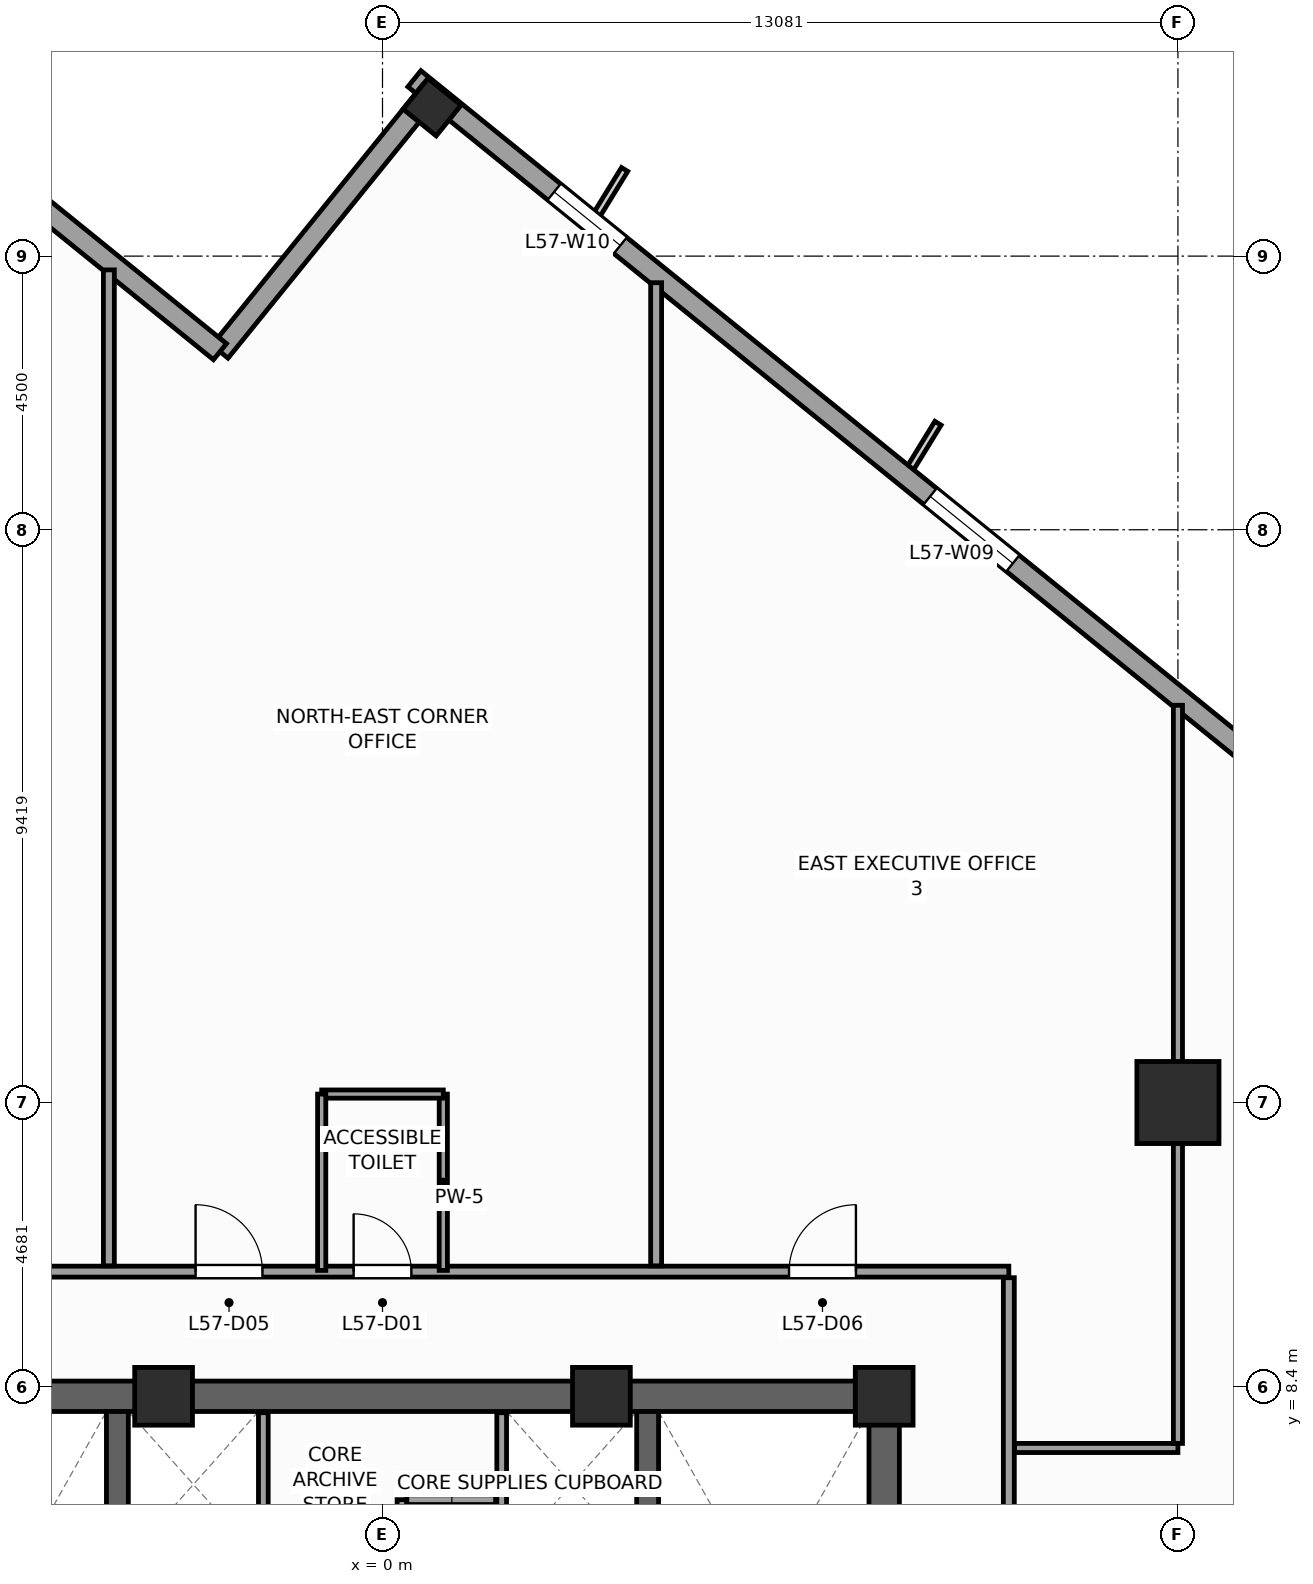
"""IFC4 building model, lengths in metres.
Left out: names, types, materials, properties, quantities, classifications, styles, units other than length and angle.
Written with IfcOpenShell. Run it as: python <this file> out.ifc"""

import sys

from ifc_helpers import new_model, si_unit, direction, frame, frame_2d, origin, origin_2d, place, context, subcontext, project, spatial, rectangle, extrude, source, transform, mapped, element, fill, save


model = new_model("IFC4")
c1 = context("Model", 3, precision=1e-05, world=origin(), true_north=direction((0.0, 1.0)))
c2 = subcontext(c1, "Body", "Model", "MODEL_VIEW")
j1 = project(units=[si_unit("LENGTHUNIT", "METRE"), si_unit("PLANEANGLEUNIT", "RADIAN")], contexts=[c1])
p1 = place(None, origin())
s1 = spatial("IfcSite", under=j1, at=p1, CompositionType="ELEMENT")
p2 = place(p1, origin())
s2 = spatial("IfcBuilding", under=s1, at=p2, CompositionType="ELEMENT")
p3 = place(p2, frame((0.0, 0.0, 236.8)))
s3 = spatial("IfcBuildingStorey", under=s2, at=p3, CompositionType="ELEMENT", Elevation=236.8)
p4 = place(p3, frame((-8.5, 8.25, 0.0), z_axis=(0.0, 0.0, 1.0), x_axis=(1.0, 0.0, 0.0)))
e1 = element("IfcWall", 1, at=p4, inside=s3, PredefinedType="SHEAR", context=c2, shape_type="SweptSolid", body=[
    extrude(rectangle(XDim=17.0, YDim=0.5, at=frame_2d((8.5, 0.0))), origin(), (0.0, 0.0, 1.0), 3.9),
])
p5 = place(p3, frame((8.25, -8.0, 0.0), z_axis=(0.0, 0.0, 1.0), x_axis=(0.0, 1.0, 0.0)))
e2 = element("IfcWall", 2, at=p5, inside=s3, PredefinedType="SHEAR", context=c2, shape_type="SweptSolid", body=[
    extrude(rectangle(XDim=16.0, YDim=0.5, at=frame_2d((8.0, 0.0))), origin(), (0.0, 0.0, 1.0), 3.9),
])
p6 = place(p5, frame((4.69, 0.0, 0.0)))
e3 = element("IfcOpeningElement", 3, at=p6, cuts=e2, PredefinedType="OPENING", context=c2, shape_type="SweptSolid", body=[
    extrude(rectangle(XDim=1.3, YDim=2.2, at=frame_2d((0.65, 1.1))), frame((0.0, 0.26, 0.0), z_axis=(0.0, -1.0, 0.0), x_axis=(1.0, 0.0, 0.0)), (0.0, 0.0, 1.0), 0.52),
])
for number, where, z_axis, x_axis in (
    (4, (-4.36, -8.0, 0.0), (0.0, 0.0, 1.0), (0.0, 1.0, 0.0)),
    (5, (4.36, -8.0, 0.0), (0.0, 0.0, 1.0), (0.0, 1.0, 0.0)),
):
    element("IfcWall", number, at=place(p3, frame(where, z_axis=z_axis, x_axis=x_axis)), inside=s3, PredefinedType="SHEAR", context=c2, shape_type="SweptSolid", body=[
        extrude(rectangle(XDim=16.0, YDim=0.36, at=frame_2d((8.0, 0.0))), origin(), (0.0, 0.0, 1.0), 3.9),
    ])
m1 = source(origin(), c2, "Body", "SweptSolid", [
    extrude(rectangle(XDim=0.95, YDim=0.95, at=origin_2d()), origin(), (0.0, 0.0, 1.0), 3.9),
])
for number, where, z_axis, x_axis in (
    (6, (8.25, 8.25, 0.0), (0.0, 0.0, 1.0), (1.0, 0.0, 0.0)),
    (7, (-3.6, 8.25, 0.0), (0.0, 0.0, 1.0), (1.0, 0.0, 0.0)),
    (8, (3.6, 8.25, 0.0), (0.0, 0.0, 1.0), (1.0, 0.0, 0.0)),
):
    element("IfcColumn", number, at=place(p3, frame(where, z_axis=z_axis, x_axis=x_axis)), inside=s3, PredefinedType="PILASTER", context=c2, shape_type="MappedRepresentation", body=[
        mapped(m1, transform((0.0, 0.0, 0.0), scale=1.0)),
    ])
m2 = source(origin(), c2, "Body", "SweptSolid", [
    extrude(rectangle(XDim=1.35, YDim=1.35, at=origin_2d()), origin(), (0.0, 0.0, 1.0), 3.9),
])
p7 = place(p3, frame((13.081, 13.081, 0.0), z_axis=(0.0, 0.0, 1.0), x_axis=(1.0, 0.0, 0.0)))
e9 = element("IfcColumn", 9, at=p7, inside=s3, PredefinedType="COLUMN", context=c2, shape_type="MappedRepresentation", body=[
    mapped(m2, transform((0.0, 0.0, 0.0), scale=1.0)),
])
m3 = source(origin(), c2, "Body", "SweptSolid", [
    extrude(rectangle(XDim=0.65, YDim=0.7, at=origin_2d()), origin(), (0.0, 0.0, 1.0), 3.9),
])
p8 = place(p3, frame((0.815, 29.45, 0.0), z_axis=(0.0, 0.0, 1.0), x_axis=(0.62932039105, 0.777145961457, 0.0)))
e10 = element("IfcColumn", 10, at=p8, inside=s3, PredefinedType="COLUMN", context=c2, shape_type="MappedRepresentation", body=[
    mapped(m3, transform((0.0, 0.0, 0.0), scale=1.0)),
])
p9 = place(p3, frame((29.154, 6.733, 0.0), z_axis=(0.0, 0.0, 1.0), x_axis=(-0.77714192302, 0.629325378072, 0.0)))
e11 = element("IfcWall", 11, at=p9, inside=s3, PredefinedType="STANDARD", context=c2, shape_type="SweptSolid", body=[
    extrude(rectangle(XDim=36.84, YDim=0.34, at=frame_2d((18.42, 0.0))), origin(), (0.0, 0.0, 1.0), 2.96),
])
p10 = place(p9, frame((3.721, 0.0, 0.48)))
e12 = element("IfcOpeningElement", 12, at=p10, cuts=e11, PredefinedType="OPENING", context=c2, shape_type="SweptSolid", body=[
    extrude(rectangle(XDim=1.4, YDim=2.4, at=frame_2d((0.7, 1.2))), frame((0.0, 0.18, 0.0), z_axis=(0.0, -1.0, 0.0), x_axis=(1.0, 0.0, 0.0)), (0.0, 0.0, 1.0), 0.36),
])
p11 = place(p9, frame((9.809, 0.0, 0.58)))
e13 = element("IfcOpeningElement", 13, at=p11, cuts=e11, PredefinedType="OPENING", context=c2, shape_type="SweptSolid", body=[
    extrude(rectangle(XDim=1.75, YDim=2.3, at=frame_2d((0.875, 1.15))), frame((0.0, 0.18, 0.0), z_axis=(0.0, -1.0, 0.0), x_axis=(1.0, 0.0, 0.0)), (0.0, 0.0, 1.0), 0.36),
])
p12 = place(p9, frame((16.058, 0.0, 0.58)))
e14 = element("IfcOpeningElement", 14, at=p12, cuts=e11, PredefinedType="OPENING", context=c2, shape_type="SweptSolid", body=[
    extrude(rectangle(XDim=1.75, YDim=2.3, at=frame_2d((0.875, 1.15))), frame((0.0, 0.18, 0.0), z_axis=(0.0, -1.0, 0.0), x_axis=(1.0, 0.0, 0.0)), (0.0, 0.0, 1.0), 0.36),
])
p13 = place(p9, frame((24.176, 0.0, 0.58)))
e15 = element("IfcOpeningElement", 15, at=p13, cuts=e11, PredefinedType="OPENING", context=c2, shape_type="SweptSolid", body=[
    extrude(rectangle(XDim=1.75, YDim=2.3, at=frame_2d((0.875, 1.15))), frame((0.0, 0.18, 0.0), z_axis=(0.0, -1.0, 0.0), x_axis=(1.0, 0.0, 0.0)), (0.0, 0.0, 1.0), 0.36),
])
p14 = place(p9, frame((32.482, 0.0, 0.48)))
e16 = element("IfcOpeningElement", 16, at=p14, cuts=e11, PredefinedType="OPENING", context=c2, shape_type="SweptSolid", body=[
    extrude(rectangle(XDim=1.4, YDim=2.4, at=frame_2d((0.7, 1.2))), frame((0.0, 0.18, 0.0), z_axis=(0.0, -1.0, 0.0), x_axis=(1.0, 0.0, 0.0)), (0.0, 0.0, 1.0), 0.36),
])
p15 = place(p3, frame((0.789, 29.703, 0.0), z_axis=(0.0, 0.0, 1.0), x_axis=(-0.629323365087, -0.77714355312, 0.0)))
e17 = element("IfcWall", 17, at=p15, inside=s3, PredefinedType="STANDARD", context=c2, shape_type="SweptSolid", body=[
    extrude(rectangle(XDim=5.5, YDim=0.34, at=frame_2d((2.75, 0.0))), origin(), (0.0, 0.0, 1.0), 3.66),
])
p16 = place(p3, frame((-2.673, 25.429, 0.0), z_axis=(0.0, 0.0, 1.0), x_axis=(-0.777162640055, 0.629299794138, 0.0)))
e18 = element("IfcWall", 18, at=p16, inside=s3, PredefinedType="STANDARD", context=c2, shape_type="SweptSolid", body=[
    extrude(rectangle(XDim=5.67, YDim=0.34, at=frame_2d((2.835, 0.0))), origin(), (0.0, 0.0, 1.0), 3.66),
])
for number, where, z_axis, x_axis in (
    (19, (-1.96, 4.58, 0.0), (0.0, 0.0, 1.0), (0.0, 1.0, 0.0)),
    (20, (1.96, 4.58, 0.0), (0.0, 0.0, 1.0), (0.0, 1.0, 0.0)),
):
    element("IfcWall", number, at=place(p3, frame(where, z_axis=z_axis, x_axis=x_axis)), inside=s3, PredefinedType="PARTITIONING", context=c2, shape_type="SweptSolid", body=[
        extrude(rectangle(XDim=3.4, YDim=0.16, at=frame_2d((1.7, 0.0))), origin(), (0.0, 0.0, 1.0), 3.66),
    ])
p17 = place(p3, frame((0.32, 4.6, 0.0), z_axis=(0.0, 0.0, 1.0), x_axis=(0.0, 1.0, 0.0)))
e21 = element("IfcWall", 21, at=p17, inside=s3, PredefinedType="PARTITIONING", context=c2, shape_type="SweptSolid", body=[
    extrude(rectangle(XDim=1.95, YDim=0.16, at=frame_2d((0.975, 0.0))), origin(), (0.0, 0.0, 1.0), 3.66),
])
p18 = place(p3, frame((0.4, 6.55, 0.0), z_axis=(0.0, 0.0, 1.0), x_axis=(1.0, 0.0, 0.0)))
e22 = element("IfcWall", 22, at=p18, inside=s3, PredefinedType="PARTITIONING", context=c2, shape_type="SweptSolid", body=[
    extrude(rectangle(XDim=1.46, YDim=0.16, at=frame_2d((0.73, 0.0))), origin(), (0.0, 0.0, 1.0), 3.66),
])
p19 = place(p3, frame((-11.4, 10.3, 0.0), z_axis=(0.0, 0.0, 1.0), x_axis=(1.0, 0.0, 0.0)))
e23 = element("IfcWall", 23, at=p19, inside=s3, PredefinedType="PARTITIONING", context=c2, shape_type="SweptSolid", body=[
    extrude(rectangle(XDim=21.7, YDim=0.18, at=frame_2d((10.85, 0.0))), origin(), (0.0, 0.0, 1.0), 3.66),
])
p20 = place(p19, frame((10.925, 0.0, 0.0)))
e24 = element("IfcOpeningElement", 24, at=p20, cuts=e23, PredefinedType="OPENING", context=c2, shape_type="SweptSolid", body=[
    extrude(rectangle(XDim=0.95, YDim=2.1, at=frame_2d((0.475, 1.05))), frame((0.0, 0.1, 0.0), z_axis=(0.0, -1.0, 0.0), x_axis=(1.0, 0.0, 0.0)), (0.0, 0.0, 1.0), 0.2),
])
p21 = place(p19, frame((3.724, 0.0, 0.0)))
e25 = element("IfcOpeningElement", 25, at=p21, cuts=e23, PredefinedType="OPENING", context=c2, shape_type="SweptSolid", body=[
    extrude(rectangle(XDim=1.1, YDim=2.2, at=frame_2d((0.55, 1.1))), frame((0.0, 0.1, 0.0), z_axis=(0.0, -1.0, 0.0), x_axis=(1.0, 0.0, 0.0)), (0.0, 0.0, 1.0), 0.2),
])
p22 = place(p19, frame((8.326, 0.0, 0.0)))
e26 = element("IfcOpeningElement", 26, at=p22, cuts=e23, PredefinedType="OPENING", context=c2, shape_type="SweptSolid", body=[
    extrude(rectangle(XDim=1.1, YDim=2.2, at=frame_2d((0.55, 1.1))), frame((0.0, 0.1, 0.0), z_axis=(0.0, -1.0, 0.0), x_axis=(1.0, 0.0, 0.0)), (0.0, 0.0, 1.0), 0.2),
])
p23 = place(p19, frame((18.085, 0.0, 0.0)))
e27 = element("IfcOpeningElement", 27, at=p23, cuts=e23, PredefinedType="OPENING", context=c2, shape_type="SweptSolid", body=[
    extrude(rectangle(XDim=1.1, YDim=2.2, at=frame_2d((0.55, 1.1))), frame((0.0, 0.1, 0.0), z_axis=(0.0, -1.0, 0.0), x_axis=(1.0, 0.0, 0.0)), (0.0, 0.0, 1.0), 0.2),
])
p24 = place(p3, frame((10.3, -10.2, 0.0), z_axis=(0.0, 0.0, 1.0), x_axis=(0.0, 1.0, 0.0)))
e28 = element("IfcWall", 28, at=p24, inside=s3, PredefinedType="PARTITIONING", context=c2, shape_type="SweptSolid", body=[
    extrude(rectangle(XDim=20.4, YDim=0.18, at=frame_2d((10.2, 0.0))), origin(), (0.0, 0.0, 1.0), 3.66),
])
p25 = place(p24, frame((14.95, 0.0, 0.0)))
e29 = element("IfcOpeningElement", 29, at=p25, cuts=e28, PredefinedType="OPENING", context=c2, shape_type="SweptSolid", body=[
    extrude(rectangle(XDim=1.1, YDim=2.2, at=frame_2d((0.55, 1.1))), frame((0.0, 0.1, 0.0), z_axis=(0.0, -1.0, 0.0), x_axis=(1.0, 0.0, 0.0)), (0.0, 0.0, 1.0), 0.2),
])
p26 = place(p24, frame((9.65, 0.0, 0.0)))
e30 = element("IfcOpeningElement", 30, at=p26, cuts=e28, PredefinedType="OPENING", context=c2, shape_type="SweptSolid", body=[
    extrude(rectangle(XDim=1.1, YDim=2.2, at=frame_2d((0.55, 1.1))), frame((0.0, 0.1, 0.0), z_axis=(0.0, -1.0, 0.0), x_axis=(1.0, 0.0, 0.0)), (0.0, 0.0, 1.0), 0.2),
])
p27 = place(p24, frame((4.35, 0.0, 0.0)))
e31 = element("IfcOpeningElement", 31, at=p27, cuts=e28, PredefinedType="OPENING", context=c2, shape_type="SweptSolid", body=[
    extrude(rectangle(XDim=1.1, YDim=2.2, at=frame_2d((0.55, 1.1))), frame((0.0, 0.1, 0.0), z_axis=(0.0, -1.0, 0.0), x_axis=(1.0, 0.0, 0.0)), (0.0, 0.0, 1.0), 0.2),
])
p28 = place(p3, frame((-4.5, 10.395, 0.0), z_axis=(0.0, 0.0, 1.0), x_axis=(0.0, 1.0, 0.0)))
e32 = element("IfcWall", 32, at=p28, inside=s3, PredefinedType="PARTITIONING", context=c2, shape_type="SweptSolid", body=[
    extrude(rectangle(XDim=16.378, YDim=0.18, at=frame_2d((8.189, 0.0))), origin(), (0.0, 0.0, 1.0), 3.66),
])
p29 = place(p3, frame((4.5, 10.395, 0.0), z_axis=(0.0, 0.0, 1.0), x_axis=(0.0, 1.0, 0.0)))
e33 = element("IfcWall", 33, at=p29, inside=s3, PredefinedType="PARTITIONING", context=c2, shape_type="SweptSolid", body=[
    extrude(rectangle(XDim=16.168, YDim=0.18, at=frame_2d((8.084, 0.0))), origin(), (0.0, 0.0, 1.0), 3.66),
])
p30 = place(p3, frame((10.395, 7.4, 0.0), z_axis=(0.0, 0.0, 1.0), x_axis=(1.0, 0.0, 0.0)))
e34 = element("IfcWall", 34, at=p30, inside=s3, PredefinedType="PARTITIONING", context=c2, shape_type="SweptSolid", body=[
    extrude(rectangle(XDim=2.686, YDim=0.15, at=frame_2d((1.343, 0.0))), origin(), (0.0, 0.0, 1.0), 3.66),
])
p31 = place(p3, frame((13.081, 7.475, 0.0), z_axis=(0.0, 0.0, 1.0), x_axis=(0.0, 1.0, 0.0)))
e35 = element("IfcWall", 35, at=p31, inside=s3, PredefinedType="PARTITIONING", context=c2, shape_type="SweptSolid", body=[
    extrude(rectangle(XDim=12.139, YDim=0.15, at=frame_2d((6.069, 0.0))), origin(), (0.0, 0.0, 1.0), 2.76),
])
p32 = place(p3, frame((1.0, 10.32, 0.0), z_axis=(0.0, 0.0, 1.0), x_axis=(0.0, 1.0, 0.0)))
e36 = element("IfcWall", 36, at=p32, inside=s3, PredefinedType="PARTITIONING", context=c2, shape_type="SweptSolid", body=[
    extrude(rectangle(XDim=2.9, YDim=0.135, at=frame_2d((1.45, 0.0))), origin(), (0.0, 0.0, 1.0), 3.66),
])
p33 = place(p3, frame((-1.0, 13.22, 0.0), z_axis=(0.0, 0.0, 1.0), x_axis=(1.0, 0.0, 0.0)))
e37 = element("IfcWall", 37, at=p33, inside=s3, PredefinedType="PARTITIONING", context=c2, shape_type="SweptSolid", body=[
    extrude(rectangle(XDim=2.0, YDim=0.135, at=frame_2d((1.0, 0.0))), origin(), (0.0, 0.0, 1.0), 2.76),
])
p34 = place(p3, frame((-1.0, 10.32, 0.0), z_axis=(0.0, 0.0, 1.0), x_axis=(0.0, 1.0, 0.0)))
e38 = element("IfcWall", 38, at=p34, inside=s3, PredefinedType="PARTITIONING", context=c2, shape_type="SweptSolid", body=[
    extrude(rectangle(XDim=2.9, YDim=0.135, at=frame_2d((1.45, 0.0))), origin(), (0.0, 0.0, 1.0), 3.66),
])
m4 = source(origin(), c2, "Body", "SweptSolid", [
    extrude(rectangle(XDim=1.75, YDim=2.3, at=frame_2d((0.875, 1.15))), frame((0.0, 0.03, 0.0), z_axis=(0.0, -1.0, 0.0), x_axis=(1.0, 0.0, 0.0)), (0.0, 0.0, 1.0), 0.06),
])
p35 = place(p13, origin())
e39 = element("IfcWindow", 39, at=p35, inside=s3, PartitioningType="SINGLE_PANEL", PredefinedType="WINDOW", context=c2, shape_type="MappedRepresentation", body=[
    mapped(m4, transform((0.0, 0.0, 0.0), scale=1.0)),
])
fill(e15, e39)
m5 = source(origin(), c2, "Body", "SweptSolid", [
    extrude(rectangle(XDim=1.4, YDim=2.4, at=frame_2d((0.7, 1.2))), frame((0.0, 0.03, 0.0), z_axis=(0.0, -1.0, 0.0), x_axis=(1.0, 0.0, 0.0)), (0.0, 0.0, 1.0), 0.06),
])
p36 = place(p14, origin())
e40 = element("IfcWindow", 40, at=p36, inside=s3, PartitioningType="SINGLE_PANEL", PredefinedType="WINDOW", context=c2, shape_type="MappedRepresentation", body=[
    mapped(m5, transform((0.0, 0.0, 0.0), scale=1.0)),
])
fill(e16, e40)
m6 = source(origin(), c2, "Body", "SweptSolid", [
    extrude(rectangle(XDim=0.95, YDim=2.1, at=frame_2d((0.475, 1.05))), frame((0.0, 0.025, 0.0), z_axis=(0.0, -1.0, 0.0), x_axis=(1.0, 0.0, 0.0)), (0.0, 0.0, 1.0), 0.05),
])
p37 = place(p20, origin())
e41 = element("IfcDoor", 41, at=p37, inside=s3, OperationType="SINGLE_SWING_LEFT", PredefinedType="DOOR", context=c2, shape_type="MappedRepresentation", body=[
    mapped(m6, transform((0.0, 0.0, 0.0), scale=1.0)),
])
fill(e24, e41)
m7 = source(origin(), c2, "Body", "SweptSolid", [
    extrude(rectangle(XDim=1.1, YDim=2.2, at=frame_2d((0.55, 1.1))), frame((0.0, 0.025, 0.0), z_axis=(0.0, -1.0, 0.0), x_axis=(1.0, 0.0, 0.0)), (0.0, 0.0, 1.0), 0.05),
])
p38 = place(p22, origin())
e42 = element("IfcDoor", 42, at=p38, inside=s3, OperationType="SINGLE_SWING_LEFT", PredefinedType="DOOR", context=c2, shape_type="MappedRepresentation", body=[
    mapped(m7, transform((0.0, 0.0, 0.0), scale=1.0)),
])
fill(e26, e42)
p39 = place(p23, origin())
e43 = element("IfcDoor", 43, at=p39, inside=s3, OperationType="SINGLE_SWING_RIGHT", PredefinedType="DOOR", context=c2, shape_type="MappedRepresentation", body=[
    mapped(m7, transform((0.0, 0.0, 0.0), scale=1.0)),
])
fill(e27, e43)
save(model, sys.argv[1])
